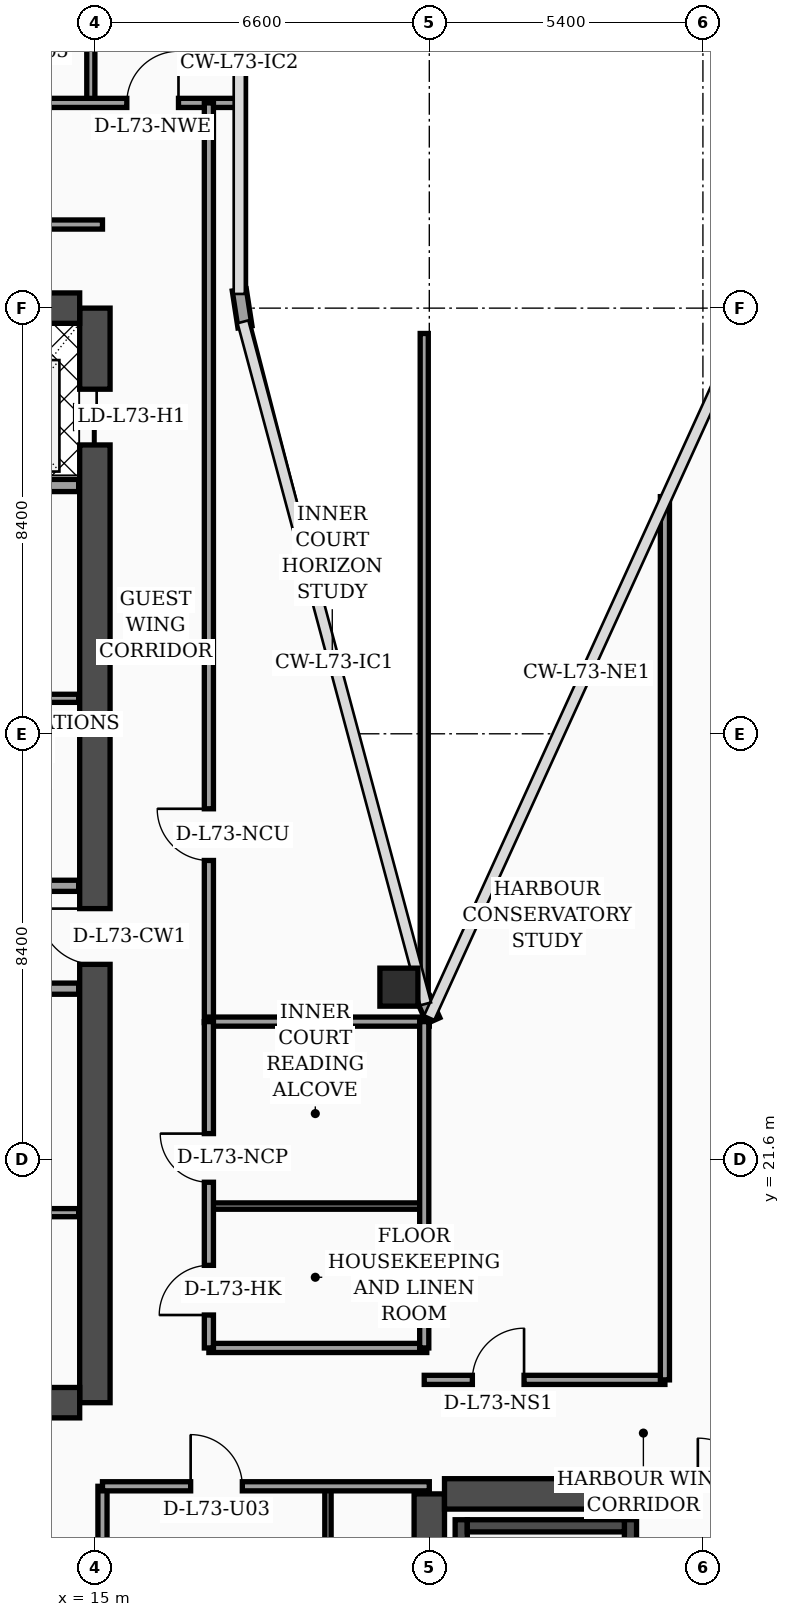
"""IFC4 building model, lengths in metres.
Left out: names, types, materials, properties, quantities, classifications, styles, units other than length and angle.
Written with IfcOpenShell. Run it as: python <this file> out.ifc"""

import sys

from ifc_helpers import new_model, si_unit, direction, frame, frame_2d, origin, origin_2d, place, context, subcontext, project, spatial, rectangle, hollow_rectangle, extrude, element, fill, save


model = new_model("IFC4")
c1 = context("Model", 3, precision=1e-05, world=origin(), true_north=direction((0.0, 1.0)))
c2 = subcontext(c1, "Body", "Model", "MODEL_VIEW")
j1 = project(units=[si_unit("LENGTHUNIT", "METRE"), si_unit("PLANEANGLEUNIT", "RADIAN")], contexts=[c1])
p1 = place(None, origin())
s1 = spatial("IfcSite", under=j1, at=p1, CompositionType="ELEMENT")
p2 = place(p1, origin())
s2 = spatial("IfcBuilding", under=s1, at=p2, CompositionType="ELEMENT")
p3 = place(p2, frame((0.0, 0.0, 294.9)))
s3 = spatial("IfcBuildingStorey", under=s2, at=p3, CompositionType="ELEMENT", Elevation=294.9)
p4 = place(p3, frame((15.0, 16.8, 0.0), z_axis=(0.0, 0.0, 1.0), x_axis=(0.0, 1.0, 0.0)))
e1 = element("IfcWall", 1, at=p4, inside=s3, PredefinedType="SHEAR", context=c2, shape_type="SweptSolid", body=[
    extrude(rectangle(XDim=21.6, YDim=0.6, at=frame_2d((10.8, 0.0))), origin(), (0.0, 0.0, 1.0), 3.56),
])
p5 = place(p4, frame((8.65, 0.0, 0.0)))
e2 = element("IfcOpeningElement", 2, at=p5, cuts=e1, PredefinedType="OPENING", context=c2, shape_type="SweptSolid", body=[
    extrude(rectangle(XDim=1.1, YDim=2.2, at=frame_2d((0.55, 1.1))), frame((0.0, 0.31, 0.0), z_axis=(0.0, -1.0, 0.0), x_axis=(1.0, 0.0, 0.0)), (0.0, 0.0, 1.0), 0.62),
])
p6 = place(p4, frame((18.9, 0.0, 0.0)))
e3 = element("IfcOpeningElement", 3, at=p6, cuts=e1, PredefinedType="OPENING", context=c2, shape_type="SweptSolid", body=[
    extrude(rectangle(XDim=1.1, YDim=2.2, at=frame_2d((0.55, 1.1))), frame((0.0, 0.31, 0.0), z_axis=(0.0, -1.0, 0.0), x_axis=(1.0, 0.0, 0.0)), (0.0, 0.0, 1.0), 0.62),
])
p7 = place(p3, frame((4.5, 38.4, 0.0), z_axis=(0.0, 0.0, 1.0), x_axis=(1.0, 0.0, 0.0)))
e4 = element("IfcWall", 4, at=p7, inside=s3, PredefinedType="SHEAR", context=c2, shape_type="SweptSolid", body=[
    extrude(rectangle(XDim=10.2, YDim=0.6, at=frame_2d((5.1, 0.0))), origin(), (0.0, 0.0, 1.0), 3.56),
])
p8 = place(p7, frame((5.8, 0.0, 0.0)))
e5 = element("IfcOpeningElement", 5, at=p8, cuts=e4, PredefinedType="OPENING", context=c2, shape_type="SweptSolid", body=[
    extrude(rectangle(XDim=1.1, YDim=2.2, at=frame_2d((0.55, 1.1))), frame((0.0, 0.31, 0.0), z_axis=(0.0, -1.0, 0.0), x_axis=(1.0, 0.0, 0.0)), (0.0, 0.0, 1.0), 0.62),
])
p9 = place(p3, frame((4.5, 16.8, 0.0), z_axis=(0.0, 0.0, 1.0), x_axis=(1.0, 0.0, 0.0)))
e6 = element("IfcWall", 6, at=p9, inside=s3, PredefinedType="SHEAR", context=c2, shape_type="SweptSolid", body=[
    extrude(rectangle(XDim=10.2, YDim=0.6, at=frame_2d((5.1, 0.0))), origin(), (0.0, 0.0, 1.0), 3.56),
])
p10 = place(p3, frame((21.6, 4.6, 0.0), z_axis=(0.0, 0.0, 1.0), x_axis=(0.0, 1.0, 0.0)))
e7 = element("IfcWall", 7, at=p10, inside=s3, PredefinedType="SHEAR", context=c2, shape_type="SweptSolid", body=[
    extrude(rectangle(XDim=10.4, YDim=0.6, at=frame_2d((5.2, 0.0))), origin(), (0.0, 0.0, 1.0), 3.56),
])
p11 = place(p3, frame((21.9, 15.0, 0.0), z_axis=(0.0, 0.0, 1.0), x_axis=(1.0, 0.0, 0.0)))
e8 = element("IfcWall", 8, at=p11, inside=s3, PredefinedType="SHEAR", context=c2, shape_type="SweptSolid", body=[
    extrude(rectangle(XDim=10.2, YDim=0.6, at=frame_2d((5.1, 0.0))), origin(), (0.0, 0.0, 1.0), 3.56),
])
p12 = place(p11, frame((5.0, 0.0, 0.0)))
e9 = element("IfcOpeningElement", 9, at=p12, cuts=e8, PredefinedType="OPENING", context=c2, shape_type="SweptSolid", body=[
    extrude(rectangle(XDim=1.1, YDim=2.2, at=frame_2d((0.55, 1.1))), frame((0.0, 0.31, 0.0), z_axis=(0.0, -1.0, 0.0), x_axis=(1.0, 0.0, 0.0)), (0.0, 0.0, 1.0), 0.62),
])
p13 = place(p3, frame((22.23, 4.9, 0.0), z_axis=(0.0, 0.0, 1.0), x_axis=(0.0, 1.0, 0.0)))
e10 = element("IfcWall", 10, at=p13, inside=s3, PredefinedType="SOLIDWALL", context=c2, shape_type="SweptSolid", body=[
    extrude(rectangle(XDim=9.59, YDim=0.24, at=frame_2d((4.795, 0.0))), origin(), (0.0, 0.0, 1.0), 3.56),
])
p14 = place(p3, frame((25.57, 4.9, 0.0), z_axis=(0.0, 0.0, 1.0), x_axis=(0.0, 1.0, 0.0)))
e11 = element("IfcWall", 11, at=p14, inside=s3, PredefinedType="SOLIDWALL", context=c2, shape_type="SweptSolid", body=[
    extrude(rectangle(XDim=9.59, YDim=0.24, at=frame_2d((4.795, 0.0))), origin(), (0.0, 0.0, 1.0), 3.56),
])
p15 = place(p14, frame((0.35, 0.0, 0.0)))
e12 = element("IfcOpeningElement", 12, at=p15, cuts=e11, PredefinedType="OPENING", context=c2, shape_type="SweptSolid", body=[
    extrude(rectangle(XDim=1.15, YDim=2.2, at=frame_2d((0.575, 1.1))), frame((0.0, 0.13, 0.0), z_axis=(0.0, -1.0, 0.0), x_axis=(1.0, 0.0, 0.0)), (0.0, 0.0, 1.0), 0.26),
])
p16 = place(p3, frame((22.35, 14.37, 0.0), z_axis=(0.0, 0.0, 1.0), x_axis=(1.0, 0.0, 0.0)))
e13 = element("IfcWall", 13, at=p16, inside=s3, PredefinedType="SOLIDWALL", context=c2, shape_type="SweptSolid", body=[
    extrude(rectangle(XDim=3.1, YDim=0.24, at=frame_2d((1.55, 0.0))), origin(), (0.0, 0.0, 1.0), 3.56),
])
p17 = place(p3, frame((21.0, 25.0, 0.0), z_axis=(0.0, 0.0, 1.0), x_axis=(1.0, 0.0, 0.0)))
e14 = element("IfcColumn", 14, at=p17, inside=s3, PredefinedType="COLUMN", context=c2, shape_type="SweptSolid", body=[
    extrude(hollow_rectangle(XDim=0.75, YDim=0.75, WallThickness=0.032, at=origin_2d()), origin(), (0.0, 0.0, 1.0), 3.56),
])
p18 = place(p3, frame((21.68, 24.34, 0.0), z_axis=(0.0, 0.0, 1.0), x_axis=(-0.40758134973, 0.913168901875, 0.0)))
e15 = element("IfcWall", 15, at=p18, inside=s3, PredefinedType="SOLIDWALL", context=c2, shape_type="SweptSolid", body=[
    extrude(rectangle(XDim=0.471, YDim=0.28, at=frame_2d((0.235, 0.0))), origin(), (0.0, 0.0, 1.0), 3.56),
])
p19 = place(p3, frame((17.962, 38.03, 0.0), z_axis=(0.0, 0.0, 1.0), x_axis=(-0.15141125477, 0.988470855377, 0.0)))
e16 = element("IfcWall", 16, at=p19, inside=s3, PredefinedType="SOLIDWALL", context=c2, shape_type="SweptSolid", body=[
    extrude(rectangle(XDim=0.739, YDim=0.28, at=frame_2d((0.369, 0.0))), origin(), (0.0, 0.0, 1.0), 3.56),
])
p20 = place(p3, frame((9.68, 20.55, 0.0), z_axis=(0.0, 0.0, 1.0), x_axis=(1.0, 0.0, 0.0)))
e17 = element("IfcWall", 17, at=p20, inside=s3, PredefinedType="PARTITIONING", context=c2, shape_type="SweptSolid", body=[
    extrude(rectangle(XDim=5.0, YDim=0.16, at=frame_2d((2.5, 0.0))), origin(), (0.0, 0.0, 1.0), 3.56),
])
p21 = place(p20, frame((1.1, 0.0, 0.0)))
e18 = element("IfcOpeningElement", 18, at=p21, cuts=e17, PredefinedType="OPENING", context=c2, shape_type="SweptSolid", body=[
    extrude(rectangle(XDim=0.98, YDim=2.15, at=frame_2d((0.49, 1.075))), frame((0.0, 0.09, 0.0), z_axis=(0.0, -1.0, 0.0), x_axis=(1.0, 0.0, 0.0)), (0.0, 0.0, 1.0), 0.18),
])
p22 = place(p3, frame((9.68, 24.97, 0.0), z_axis=(0.0, 0.0, 1.0), x_axis=(1.0, 0.0, 0.0)))
e19 = element("IfcWall", 19, at=p22, inside=s3, PredefinedType="SOLIDWALL", context=c2, shape_type="SweptSolid", body=[
    extrude(rectangle(XDim=5.0, YDim=0.22, at=frame_2d((2.5, 0.0))), origin(), (0.0, 0.0, 1.0), 2.99),
])
p23 = place(p22, frame((0.9, 0.0, 0.0)))
e20 = element("IfcOpeningElement", 20, at=p23, cuts=e19, PredefinedType="OPENING", context=c2, shape_type="SweptSolid", body=[
    extrude(rectangle(XDim=0.98, YDim=2.15, at=frame_2d((0.49, 1.075))), frame((0.0, 0.12, 0.0), z_axis=(0.0, -1.0, 0.0), x_axis=(1.0, 0.0, 0.0)), (0.0, 0.0, 1.0), 0.24),
])
p24 = place(p3, frame((12.25, 27.0, 0.0), z_axis=(0.0, 0.0, 1.0), x_axis=(1.0, 0.0, 0.0)))
e21 = element("IfcWall", 21, at=p24, inside=s3, PredefinedType="SOLIDWALL", context=c2, shape_type="SweptSolid", body=[
    extrude(rectangle(XDim=2.43, YDim=0.22, at=frame_2d((1.215, 0.0))), origin(), (0.0, 0.0, 1.0), 3.56),
])
p25 = place(p3, frame((12.25, 30.7, 0.0), z_axis=(0.0, 0.0, 1.0), x_axis=(1.0, 0.0, 0.0)))
e22 = element("IfcWall", 22, at=p25, inside=s3, PredefinedType="PARTITIONING", context=c2, shape_type="SweptSolid", body=[
    extrude(rectangle(XDim=2.43, YDim=0.16, at=frame_2d((1.215, 0.0))), origin(), (0.0, 0.0, 1.0), 3.56),
])
p26 = place(p25, frame((0.55, 0.0, 0.0)))
e23 = element("IfcOpeningElement", 23, at=p26, cuts=e22, PredefinedType="OPENING", context=c2, shape_type="SweptSolid", body=[
    extrude(rectangle(XDim=0.98, YDim=2.15, at=frame_2d((0.49, 1.075))), frame((0.0, 0.09, 0.0), z_axis=(0.0, -1.0, 0.0), x_axis=(1.0, 0.0, 0.0)), (0.0, 0.0, 1.0), 0.18),
])
p27 = place(p3, frame((9.66, 34.9, 0.0), z_axis=(0.0, 0.0, 1.0), x_axis=(1.0, 0.0, 0.0)))
e24 = element("IfcWall", 24, at=p27, inside=s3, PredefinedType="SOLIDWALL", context=c2, shape_type="SweptSolid", body=[
    extrude(rectangle(XDim=5.02, YDim=0.24, at=frame_2d((2.51, 0.0))), origin(), (0.0, 0.0, 1.0), 3.56),
])
p28 = place(p3, frame((15.15, 2.44, 0.0), z_axis=(0.0, 0.0, 1.0), x_axis=(0.0, 1.0, 0.0)))
e25 = element("IfcWall", 25, at=p28, inside=s3, PredefinedType="PARTITIONING", context=c2, shape_type="SweptSolid", body=[
    extrude(rectangle(XDim=12.71, YDim=0.18, at=frame_2d((6.355, 0.0))), origin(), (0.0, 0.0, 1.0), 3.09),
])
p29 = place(p3, frame((19.6, 2.44, 0.0), z_axis=(0.0, 0.0, 1.0), x_axis=(0.0, 1.0, 0.0)))
e26 = element("IfcWall", 26, at=p29, inside=s3, PredefinedType="PARTITIONING", context=c2, shape_type="SweptSolid", body=[
    extrude(rectangle(XDim=12.71, YDim=0.125, at=frame_2d((6.355, 0.0))), origin(), (0.0, 0.0, 1.0), 2.59),
])
p30 = place(p29, frame((4.34, 0.0, 0.0)))
e27 = element("IfcOpeningElement", 27, at=p30, cuts=e26, PredefinedType="OPENING", context=c2, shape_type="SweptSolid", body=[
    extrude(rectangle(XDim=0.96, YDim=2.2, at=frame_2d((0.48, 1.1))), frame((0.0, 0.073, 0.0), z_axis=(0.0, -1.0, 0.0), x_axis=(1.0, 0.0, 0.0)), (0.0, 0.0, 1.0), 0.145),
])
p31 = place(p29, frame((10.18, 0.0, 0.0)))
e28 = element("IfcOpeningElement", 28, at=p31, cuts=e26, PredefinedType="OPENING", context=c2, shape_type="SweptSolid", body=[
    extrude(rectangle(XDim=0.9, YDim=2.15, at=frame_2d((0.45, 1.075))), frame((0.0, 0.073, 0.0), z_axis=(0.0, -1.0, 0.0), x_axis=(1.0, 0.0, 0.0)), (0.0, 0.0, 1.0), 0.145),
])
p32 = place(p3, frame((15.15, 15.15, 0.0), z_axis=(0.0, 0.0, 1.0), x_axis=(1.0, 0.0, 0.0)))
e29 = element("IfcWall", 29, at=p32, inside=s3, PredefinedType="PARTITIONING", context=c2, shape_type="SweptSolid", body=[
    extrude(rectangle(XDim=6.45, YDim=0.18, at=frame_2d((3.225, 0.0))), origin(), (0.0, 0.0, 1.0), 2.59),
])
p33 = place(p32, frame((1.74, 0.0, 0.0)))
e30 = element("IfcOpeningElement", 30, at=p33, cuts=e29, PredefinedType="OPENING", context=c2, shape_type="SweptSolid", body=[
    extrude(rectangle(XDim=1.02, YDim=2.2, at=frame_2d((0.51, 1.1))), frame((0.0, 0.1, 0.0), z_axis=(0.0, -1.0, 0.0), x_axis=(1.0, 0.0, 0.0)), (0.0, 0.0, 1.0), 0.2),
])
p34 = place(p3, frame((14.92, 42.45, 0.0), z_axis=(0.0, 0.0, 1.0), x_axis=(0.0, 1.0, 0.0)))
e31 = element("IfcWall", 31, at=p34, inside=s3, PredefinedType="PARTITIONING", context=c2, shape_type="SweptSolid", body=[
    extrude(rectangle(XDim=5.35, YDim=0.16, at=frame_2d((2.675, 0.0))), origin(), (0.0, 0.0, 1.0), 3.09),
])
p35 = place(p3, frame((0.08, 42.45, 0.0), z_axis=(0.0, 0.0, 1.0), x_axis=(1.0, 0.0, 0.0)))
e32 = element("IfcWall", 32, at=p35, inside=s3, PredefinedType="PARTITIONING", context=c2, shape_type="SweptSolid", body=[
    extrude(rectangle(XDim=17.77, YDim=0.18, at=frame_2d((8.885, 0.0))), origin(), (0.0, 0.0, 1.0), 2.99),
])
p36 = place(p35, frame((0.9, 0.0, 0.0)))
e33 = element("IfcOpeningElement", 33, at=p36, cuts=e32, PredefinedType="OPENING", context=c2, shape_type="SweptSolid", body=[
    extrude(rectangle(XDim=1.02, YDim=2.2, at=frame_2d((0.51, 1.1))), frame((0.0, 0.1, 0.0), z_axis=(0.0, -1.0, 0.0), x_axis=(1.0, 0.0, 0.0)), (0.0, 0.0, 1.0), 0.2),
])
p37 = place(p35, frame((4.2, 0.0, 0.0)))
e34 = element("IfcOpeningElement", 34, at=p37, cuts=e32, PredefinedType="OPENING", context=c2, shape_type="SweptSolid", body=[
    extrude(rectangle(XDim=1.02, YDim=2.2, at=frame_2d((0.51, 1.1))), frame((0.0, 0.1, 0.0), z_axis=(0.0, -1.0, 0.0), x_axis=(1.0, 0.0, 0.0)), (0.0, 0.0, 1.0), 0.2),
])
p38 = place(p35, frame((10.08, 0.0, 0.0)))
e35 = element("IfcOpeningElement", 35, at=p38, cuts=e32, PredefinedType="OPENING", context=c2, shape_type="SweptSolid", body=[
    extrude(rectangle(XDim=1.02, YDim=2.2, at=frame_2d((0.51, 1.1))), frame((0.0, 0.1, 0.0), z_axis=(0.0, -1.0, 0.0), x_axis=(1.0, 0.0, 0.0)), (0.0, 0.0, 1.0), 0.2),
])
p39 = place(p35, frame((15.55, 0.0, 0.0)))
e36 = element("IfcOpeningElement", 36, at=p39, cuts=e32, PredefinedType="OPENING", context=c2, shape_type="SweptSolid", body=[
    extrude(rectangle(XDim=1.02, YDim=2.2, at=frame_2d((0.51, 1.1))), frame((0.0, 0.1, 0.0), z_axis=(0.0, -1.0, 0.0), x_axis=(1.0, 0.0, 0.0)), (0.0, 0.0, 1.0), 0.2),
])
p40 = place(p3, frame((17.25, 24.3, 0.0), z_axis=(0.0, 0.0, 1.0), x_axis=(0.0, 1.0, 0.0)))
e37 = element("IfcWall", 37, at=p40, inside=s3, PredefinedType="PARTITIONING", context=c2, shape_type="SweptSolid", body=[
    extrude(rectangle(XDim=18.15, YDim=0.18, at=frame_2d((9.075, 0.0))), origin(), (0.0, 0.0, 1.0), 2.99),
])
p41 = place(p40, frame((3.2, 0.0, 0.0)))
e38 = element("IfcOpeningElement", 38, at=p41, cuts=e37, PredefinedType="OPENING", context=c2, shape_type="SweptSolid", body=[
    extrude(rectangle(XDim=1.02, YDim=2.2, at=frame_2d((0.51, 1.1))), frame((0.0, 0.1, 0.0), z_axis=(0.0, -1.0, 0.0), x_axis=(1.0, 0.0, 0.0)), (0.0, 0.0, 1.0), 0.2),
])
p42 = place(p3, frame((3.88, 40.05, 0.0), z_axis=(0.0, 0.0, 1.0), x_axis=(1.0, 0.0, 0.0)))
e39 = element("IfcWall", 39, at=p42, inside=s3, PredefinedType="PARTITIONING", context=c2, shape_type="SweptSolid", body=[
    extrude(rectangle(XDim=11.27, YDim=0.18, at=frame_2d((5.635, 0.0))), origin(), (0.0, 0.0, 1.0), 2.99),
])
p43 = place(p3, frame((17.25, 17.88, 0.0), z_axis=(0.0, 0.0, 1.0), x_axis=(1.0, 0.0, 0.0)))
e40 = element("IfcWall", 40, at=p43, inside=s3, PredefinedType="PARTITIONING", context=c2, shape_type="SweptSolid", body=[
    extrude(rectangle(XDim=4.3, YDim=0.18, at=frame_2d((2.15, 0.0))), origin(), (0.0, 0.0, 1.0), 3.09),
])
p44 = place(p3, frame((17.25, 20.68, 0.0), z_axis=(0.0, 0.0, 1.0), x_axis=(1.0, 0.0, 0.0)))
e41 = element("IfcWall", 41, at=p44, inside=s3, PredefinedType="PARTITIONING", context=c2, shape_type="SweptSolid", body=[
    extrude(rectangle(XDim=4.3, YDim=0.125, at=frame_2d((2.15, 0.0))), origin(), (0.0, 0.0, 1.0), 3.56),
])
p45 = place(p3, frame((17.25, 24.32, 0.0), z_axis=(0.0, 0.0, 1.0), x_axis=(1.0, 0.0, 0.0)))
e42 = element("IfcWall", 42, at=p45, inside=s3, PredefinedType="PARTITIONING", context=c2, shape_type="SweptSolid", body=[
    extrude(rectangle(XDim=4.35, YDim=0.18, at=frame_2d((2.175, 0.0))), origin(), (0.0, 0.0, 1.0), 3.56),
])
p46 = place(p3, frame((21.5, 17.88, 0.0), z_axis=(0.0, 0.0, 1.0), x_axis=(0.0, 1.0, 0.0)))
e43 = element("IfcWall", 43, at=p46, inside=s3, PredefinedType="PARTITIONING", context=c2, shape_type="SweptSolid", body=[
    extrude(rectangle(XDim=6.44, YDim=0.18, at=frame_2d((3.22, 0.0))), origin(), (0.0, 0.0, 1.0), 3.09),
])
p47 = place(p3, frame((17.25, 17.88, 0.0), z_axis=(0.0, 0.0, 1.0), x_axis=(0.0, 1.0, 0.0)))
e44 = element("IfcWall", 44, at=p47, inside=s3, PredefinedType="PARTITIONING", context=c2, shape_type="SweptSolid", body=[
    extrude(rectangle(XDim=6.44, YDim=0.18, at=frame_2d((3.22, 0.0))), origin(), (0.0, 0.0, 1.0), 3.09),
])
p48 = place(p47, frame((0.65, 0.0, 0.0)))
e45 = element("IfcOpeningElement", 45, at=p48, cuts=e44, PredefinedType="OPENING", context=c2, shape_type="SweptSolid", body=[
    extrude(rectangle(XDim=0.98, YDim=2.15, at=frame_2d((0.49, 1.075))), frame((0.0, 0.1, 0.0), z_axis=(0.0, -1.0, 0.0), x_axis=(1.0, 0.0, 0.0)), (0.0, 0.0, 1.0), 0.2),
])
p49 = place(p47, frame((3.27, 0.0, 0.0)))
e46 = element("IfcOpeningElement", 46, at=p49, cuts=e44, PredefinedType="OPENING", context=c2, shape_type="SweptSolid", body=[
    extrude(rectangle(XDim=0.96, YDim=2.2, at=frame_2d((0.48, 1.1))), frame((0.0, 0.1, 0.0), z_axis=(0.0, -1.0, 0.0), x_axis=(1.0, 0.0, 0.0)), (0.0, 0.0, 1.0), 0.2),
])
p50 = place(p3, frame((21.5, 24.85, 0.0), z_axis=(0.0, 0.0, 1.0), x_axis=(0.0, 1.0, 0.0)))
e47 = element("IfcWall", 47, at=p50, inside=s3, PredefinedType="PARTITIONING", context=c2, shape_type="SweptSolid", body=[
    extrude(rectangle(XDim=13.05, YDim=0.16, at=frame_2d((6.525, 0.0))), origin(), (0.0, 0.0, 1.0), 2.99),
])
p51 = place(p3, frame((21.5, 17.25, 0.0), z_axis=(0.0, 0.0, 1.0), x_axis=(1.0, 0.0, 0.0)))
e48 = element("IfcWall", 48, at=p51, inside=s3, PredefinedType="PARTITIONING", context=c2, shape_type="SweptSolid", body=[
    extrude(rectangle(XDim=4.75, YDim=0.18, at=frame_2d((2.375, 0.0))), origin(), (0.0, 0.0, 1.0), 3.56),
])
p52 = place(p51, frame((0.95, 0.0, 0.0)))
e49 = element("IfcOpeningElement", 49, at=p52, cuts=e48, PredefinedType="OPENING", context=c2, shape_type="SweptSolid", body=[
    extrude(rectangle(XDim=1.02, YDim=2.2, at=frame_2d((0.51, 1.1))), frame((0.0, 0.1, 0.0), z_axis=(0.0, -1.0, 0.0), x_axis=(1.0, 0.0, 0.0)), (0.0, 0.0, 1.0), 0.2),
])
p53 = place(p3, frame((26.25, 17.25, 0.0), z_axis=(0.0, 0.0, 1.0), x_axis=(0.0, 1.0, 0.0)))
e50 = element("IfcWall", 50, at=p53, inside=s3, PredefinedType="PARTITIONING", context=c2, shape_type="SweptSolid", body=[
    extrude(rectangle(XDim=17.43, YDim=0.18, at=frame_2d((8.715, 0.0))), origin(), (0.0, 0.0, 1.0), 3.09),
])
p54 = place(p33, origin())
e51 = element("IfcDoor", 51, at=p54, inside=s3, OperationType="SINGLE_SWING_LEFT", PredefinedType="DOOR", context=c2, shape_type="SweptSolid", body=[
    extrude(rectangle(XDim=1.02, YDim=2.2, at=frame_2d((0.51, 1.1))), frame((0.0, 0.025, 0.0), z_axis=(0.0, -1.0, 0.0), x_axis=(1.0, 0.0, 0.0)), (0.0, 0.0, 1.0), 0.05),
])
fill(e30, e51)
p55 = place(p39, origin())
e52 = element("IfcDoor", 52, at=p55, inside=s3, OperationType="SINGLE_SWING_RIGHT", PredefinedType="DOOR", context=c2, shape_type="SweptSolid", body=[
    extrude(rectangle(XDim=1.02, YDim=2.2, at=frame_2d((0.51, 1.1))), frame((0.0, 0.025, 0.0), z_axis=(0.0, -1.0, 0.0), x_axis=(1.0, 0.0, 0.0)), (0.0, 0.0, 1.0), 0.05),
])
fill(e36, e52)
p56 = place(p41, origin())
e53 = element("IfcDoor", 53, at=p56, inside=s3, OperationType="SINGLE_SWING_RIGHT", PredefinedType="DOOR", context=c2, shape_type="SweptSolid", body=[
    extrude(rectangle(XDim=1.02, YDim=2.2, at=frame_2d((0.51, 1.1))), frame((0.0, 0.025, 0.0), z_axis=(0.0, -1.0, 0.0), x_axis=(1.0, 0.0, 0.0)), (0.0, 0.0, 1.0), 0.05),
])
fill(e38, e53)
p57 = place(p48, origin())
e54 = element("IfcDoor", 54, at=p57, inside=s3, OperationType="SINGLE_SWING_LEFT", PredefinedType="DOOR", context=c2, shape_type="SweptSolid", body=[
    extrude(rectangle(XDim=0.98, YDim=2.15, at=frame_2d((0.49, 1.075))), frame((0.0, 0.025, 0.0), z_axis=(0.0, -1.0, 0.0), x_axis=(1.0, 0.0, 0.0)), (0.0, 0.0, 1.0), 0.05),
])
fill(e45, e54)
p58 = place(p49, origin())
e55 = element("IfcDoor", 55, at=p58, inside=s3, OperationType="SINGLE_SWING_RIGHT", PredefinedType="DOOR", context=c2, shape_type="SweptSolid", body=[
    extrude(rectangle(XDim=0.96, YDim=2.2, at=frame_2d((0.48, 1.1))), frame((0.0, 0.025, 0.0), z_axis=(0.0, -1.0, 0.0), x_axis=(1.0, 0.0, 0.0)), (0.0, 0.0, 1.0), 0.05),
])
fill(e46, e55)
p59 = place(p52, origin())
e56 = element("IfcDoor", 56, at=p59, inside=s3, OperationType="SINGLE_SWING_RIGHT", PredefinedType="DOOR", context=c2, shape_type="SweptSolid", body=[
    extrude(rectangle(XDim=1.02, YDim=2.2, at=frame_2d((0.51, 1.1))), frame((0.0, 0.025, 0.0), z_axis=(0.0, -1.0, 0.0), x_axis=(1.0, 0.0, 0.0)), (0.0, 0.0, 1.0), 0.05),
])
fill(e49, e56)
p60 = place(p5, origin())
e57 = element("IfcDoor", 57, at=p60, inside=s3, OperationType="SINGLE_SWING_RIGHT", PredefinedType="DOOR", context=c2, shape_type="SweptSolid", body=[
    extrude(rectangle(XDim=1.1, YDim=2.2, at=frame_2d((0.55, 1.1))), frame((0.0, 0.025, 0.0), z_axis=(0.0, -1.0, 0.0), x_axis=(1.0, 0.0, 0.0)), (0.0, 0.0, 1.0), 0.05),
])
fill(e2, e57)
p61 = place(p6, origin())
e58 = element("IfcDoor", 58, at=p61, inside=s3, OperationType="DOUBLE_DOOR_SLIDING", PredefinedType="DOOR", context=c2, shape_type="SweptSolid", body=[
    extrude(rectangle(XDim=1.1, YDim=2.2, at=frame_2d((0.55, 1.1))), frame((0.0, 0.025, 0.0), z_axis=(0.0, -1.0, 0.0), x_axis=(1.0, 0.0, 0.0)), (0.0, 0.0, 1.0), 0.05),
])
fill(e3, e58)
p62 = place(p12, origin())
e59 = element("IfcDoor", 59, at=p62, inside=s3, OperationType="SINGLE_SWING_LEFT", PredefinedType="DOOR", context=c2, shape_type="SweptSolid", body=[
    extrude(rectangle(XDim=1.1, YDim=2.2, at=frame_2d((0.55, 1.1))), frame((0.0, 0.025, 0.0), z_axis=(0.0, -1.0, 0.0), x_axis=(1.0, 0.0, 0.0)), (0.0, 0.0, 1.0), 0.05),
])
fill(e9, e59)
save(model, sys.argv[1])
